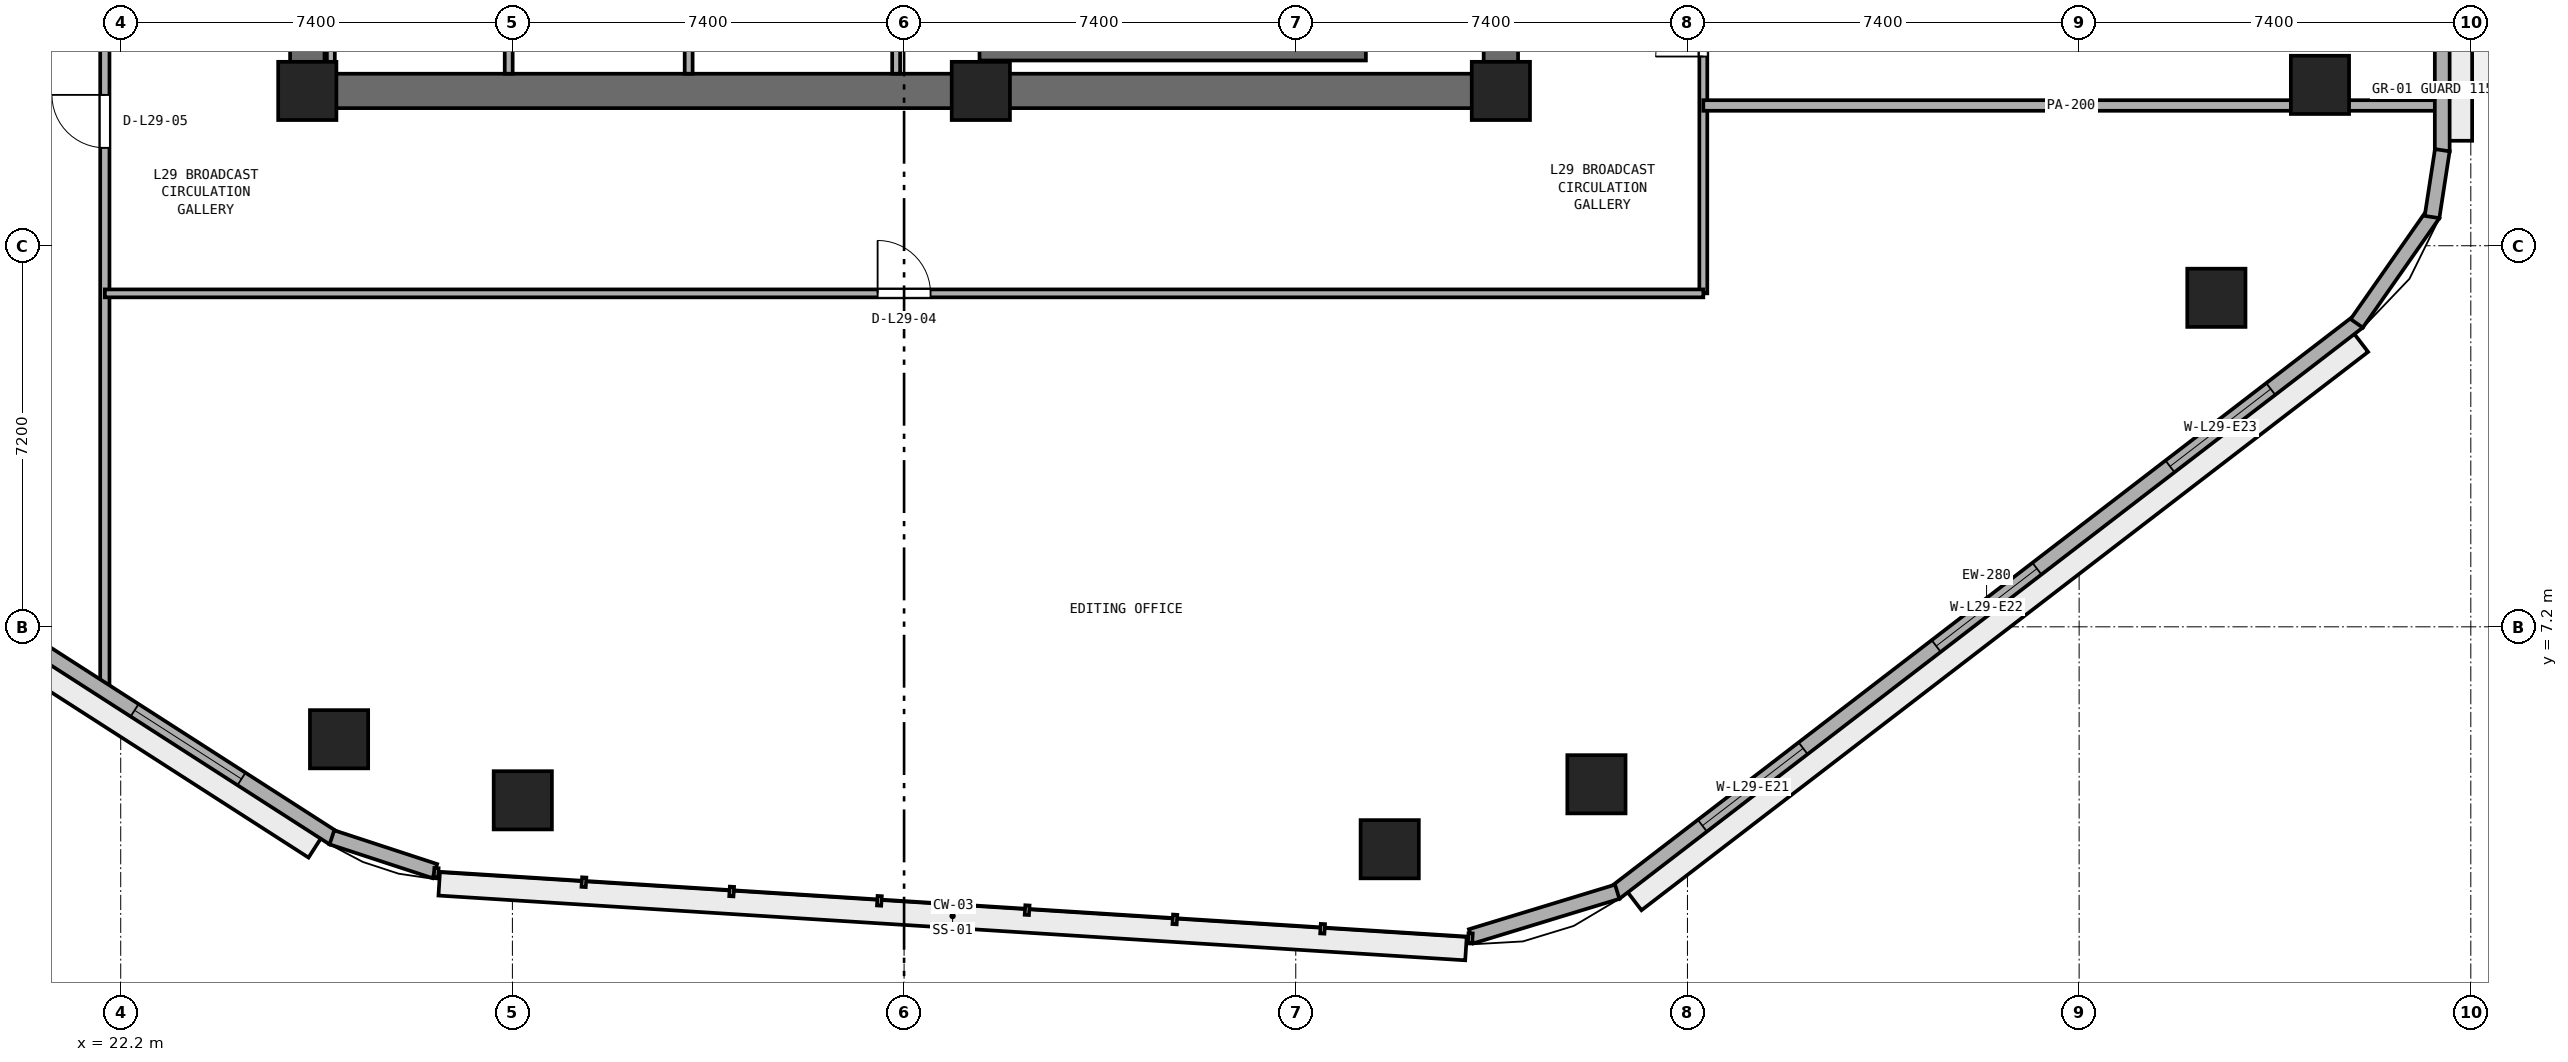
"""IFC4 building model, lengths in metres.
Left out: names, types, materials, properties, quantities, classifications, styles, units other than length and angle.
Written with IfcOpenShell. Run it as: python <this file> out.ifc"""

import sys

from ifc_helpers import new_model, si_unit, direction, frame, frame_2d, origin, origin_2d, place, context, subcontext, project, spatial, rectangle, extrude, element, fill, save


model = new_model("IFC4")
c1 = context("Model", 3, precision=1e-05, world=origin(), true_north=direction((0.0, 1.0)))
c2 = subcontext(c1, "Body", "Model", "MODEL_VIEW")
j1 = project(units=[si_unit("LENGTHUNIT", "METRE"), si_unit("PLANEANGLEUNIT", "RADIAN")], contexts=[c1])
p1 = place(None, origin())
s1 = spatial("IfcSite", under=j1, at=p1, CompositionType="ELEMENT")
p2 = place(p1, origin())
s2 = spatial("IfcBuilding", under=s1, at=p2, CompositionType="ELEMENT")
p3 = place(p2, frame((0.0, 0.0, 116.2)))
s3 = spatial("IfcBuildingStorey", under=s2, at=p3, CompositionType="ELEMENT", Elevation=116.2)
p4 = place(p3, frame((25.4, 17.325, 0.0), z_axis=(0.0, 0.0, 1.0), x_axis=(1.0, 0.0, 0.0)))
e1 = element("IfcWall", 1, at=p4, inside=s3, PredefinedType="SHEAR", context=c2, shape_type="SweptSolid", body=[
    extrude(rectangle(XDim=23.2, YDim=0.65, at=frame_2d((11.6, 0.0))), origin(), (0.0, 0.0, 1.0), 3.4),
])
p5 = place(p3, frame((25.725, 17.65, 0.0), z_axis=(0.0, 0.0, 1.0), x_axis=(0.0, 1.0, 0.0)))
e2 = element("IfcWall", 2, at=p5, inside=s3, PredefinedType="SHEAR", context=c2, shape_type="SweptSolid", body=[
    extrude(rectangle(XDim=15.1, YDim=0.65, at=frame_2d((7.55, 0.0))), origin(), (0.0, 0.0, 1.0), 3.4),
])
p6 = place(p5, frame((6.8, 0.0, 0.0)))
e3 = element("IfcOpeningElement", 3, at=p6, cuts=e2, PredefinedType="OPENING", context=c2, shape_type="SweptSolid", body=[
    extrude(rectangle(XDim=1.5, YDim=2.15, at=frame_2d((0.75, 1.075))), frame((0.0, 0.335, 0.0), z_axis=(0.0, -1.0, 0.0), x_axis=(1.0, 0.0, 0.0)), (0.0, 0.0, 1.0), 0.67),
])
p7 = place(p3, frame((48.275, 17.65, 0.0), z_axis=(0.0, 0.0, 1.0), x_axis=(0.0, 1.0, 0.0)))
e4 = element("IfcWall", 4, at=p7, inside=s3, PredefinedType="SHEAR", context=c2, shape_type="SweptSolid", body=[
    extrude(rectangle(XDim=15.1, YDim=0.65, at=frame_2d((7.55, 0.0))), origin(), (0.0, 0.0, 1.0), 3.4),
])
p8 = place(p7, frame((5.65, 0.0, 0.0)))
e5 = element("IfcOpeningElement", 5, at=p8, cuts=e4, PredefinedType="OPENING", context=c2, shape_type="SweptSolid", body=[
    extrude(rectangle(XDim=1.5, YDim=2.15, at=frame_2d((0.75, 1.075))), frame((0.0, 0.335, 0.0), z_axis=(0.0, -1.0, 0.0), x_axis=(1.0, 0.0, 0.0)), (0.0, 0.0, 1.0), 0.67),
])
for number, where, z_axis, x_axis in (
    (6, (25.725, 17.325, 0.0), (0.0, 0.0, 1.0), (1.0, 0.0, 0.0)),
    (7, (38.45, 17.325, 0.0), (0.0, 0.0, 1.0), (1.0, 0.0, 0.0)),
    (8, (48.275, 17.325, 0.0), (0.0, 0.0, 1.0), (1.0, 0.0, 0.0)),
):
    element("IfcColumn", number, at=place(p3, frame(where, z_axis=z_axis, x_axis=x_axis)), inside=s3, PredefinedType="PILASTER", context=c2, shape_type="SweptSolid", body=[
        extrude(rectangle(XDim=1.1, YDim=1.1, at=origin_2d()), origin(), (0.0, 0.0, 1.0), 3.8),
    ])
for number, where, z_axis, x_axis in (
    (9, (29.796, 3.922, 0.0), (0.0, 0.0, 1.0), (1.0, 0.0, 0.0)),
    (10, (46.175, 2.998, 0.0), (0.0, 0.0, 1.0), (1.0, 0.0, 0.0)),
    (11, (50.081, 4.225, 0.0), (0.0, 0.0, 1.0), (1.0, 0.0, 0.0)),
    (12, (61.793, 13.416, 0.0), (0.0, 0.0, 1.0), (1.0, 0.0, 0.0)),
    (13, (63.75, 17.44, 0.0), (0.0, 0.0, 1.0), (1.0, 0.0, 0.0)),
    (14, (26.325, 5.076, 0.0), (0.0, 0.0, 1.0), (1.0, 0.0, 0.0)),
):
    element("IfcColumn", number, at=place(p3, frame(where, z_axis=z_axis, x_axis=x_axis)), inside=s3, PredefinedType="COLUMN", context=c2, shape_type="SweptSolid", body=[
        extrude(rectangle(XDim=1.1, YDim=1.1, at=origin_2d()), origin(), (0.0, 0.0, 1.0), 3.8),
    ])
p9 = place(p3, frame((38.425, 18.025, 0.0), z_axis=(0.0, 0.0, 1.0), x_axis=(1.0, 0.0, 0.0)))
e15 = element("IfcWall", 15, at=p9, inside=s3, PredefinedType="SHEAR", context=c2, shape_type="SweptSolid", body=[
    extrude(rectangle(XDim=7.3, YDim=0.25, at=frame_2d((3.65, 0.0))), origin(), (0.0, 0.0, 1.0), 3.4),
])
for number, where, z_axis, x_axis in (
    (16, (26.17, 17.65, 0.0), (0.0, 0.0, 1.0), (0.0, 1.0, 0.0)),
    (17, (29.53, 17.65, 0.0), (0.0, 0.0, 1.0), (0.0, 1.0, 0.0)),
    (18, (32.93, 17.65, 0.0), (0.0, 0.0, 1.0), (0.0, 1.0, 0.0)),
    (19, (36.85, 17.65, 0.0), (0.0, 0.0, 1.0), (0.0, 1.0, 0.0)),
):
    element("IfcWall", number, at=place(p3, frame(where, z_axis=z_axis, x_axis=x_axis)), inside=s3, PredefinedType="PARTITIONING", context=c2, shape_type="SweptSolid", body=[
        extrude(rectangle(XDim=2.1, YDim=0.15, at=frame_2d((1.05, 0.0))), origin(), (0.0, 0.0, 1.0), 3.4),
    ])
p10 = place(p3, frame((52.1, 13.5, 0.0), z_axis=(0.0, 0.0, 1.0), x_axis=(0.0, 1.0, 0.0)))
e20 = element("IfcWall", 20, at=p10, inside=s3, PredefinedType="PARTITIONING", context=c2, shape_type="SweptSolid", body=[
    extrude(rectangle(XDim=33.723, YDim=0.15, at=frame_2d((16.861, 0.0))), origin(), (0.0, 0.0, 1.0), 3.4),
])
p11 = place(p10, frame((4.475, 0.0, 0.0)))
e21 = element("IfcOpeningElement", 21, at=p11, cuts=e20, PredefinedType="OPENING", context=c2, shape_type="SweptSolid", body=[
    extrude(rectangle(XDim=0.9, YDim=2.1, at=frame_2d((0.45, 1.05))), frame((0.0, 0.085, 0.0), z_axis=(0.0, -1.0, 0.0), x_axis=(1.0, 0.0, 0.0)), (0.0, 0.0, 1.0), 0.17),
])
p12 = place(p10, frame((9.85, 0.0, 0.0)))
e22 = element("IfcOpeningElement", 22, at=p12, cuts=e20, PredefinedType="OPENING", context=c2, shape_type="SweptSolid", body=[
    extrude(rectangle(XDim=0.9, YDim=2.1, at=frame_2d((0.45, 1.05))), frame((0.0, 0.085, 0.0), z_axis=(0.0, -1.0, 0.0), x_axis=(1.0, 0.0, 0.0)), (0.0, 0.0, 1.0), 0.17),
])
p13 = place(p10, frame((18.4, 0.0, 0.0)))
e23 = element("IfcOpeningElement", 23, at=p13, cuts=e20, PredefinedType="OPENING", context=c2, shape_type="SweptSolid", body=[
    extrude(rectangle(XDim=0.9, YDim=2.1, at=frame_2d((0.45, 1.05))), frame((0.0, 0.085, 0.0), z_axis=(0.0, -1.0, 0.0), x_axis=(1.0, 0.0, 0.0)), (0.0, 0.0, 1.0), 0.17),
])
p14 = place(p3, frame((21.9, 5.958, 0.0), z_axis=(0.0, 0.0, 1.0), x_axis=(0.0, 1.0, 0.0)))
e24 = element("IfcWall", 24, at=p14, inside=s3, PredefinedType="PARTITIONING", context=c2, shape_type="SweptSolid", body=[
    extrude(rectangle(XDim=30.942, YDim=0.175, at=frame_2d((15.471, 0.0))), origin(), (0.0, 0.0, 1.0), 3.4),
])
p15 = place(p14, frame((10.292, 0.0, 0.0)))
e25 = element("IfcOpeningElement", 25, at=p15, cuts=e24, PredefinedType="OPENING", context=c2, shape_type="SweptSolid", body=[
    extrude(rectangle(XDim=1.0, YDim=2.12, at=frame_2d((0.5, 1.06))), frame((0.0, 0.097, 0.0), z_axis=(0.0, -1.0, 0.0), x_axis=(1.0, 0.0, 0.0)), (0.0, 0.0, 1.0), 0.195),
])
p16 = place(p14, frame((16.842, 0.0, 0.0)))
e26 = element("IfcOpeningElement", 26, at=p16, cuts=e24, PredefinedType="OPENING", context=c2, shape_type="SweptSolid", body=[
    extrude(rectangle(XDim=1.0, YDim=2.12, at=frame_2d((0.5, 1.06))), frame((0.0, 0.097, 0.0), z_axis=(0.0, -1.0, 0.0), x_axis=(1.0, 0.0, 0.0)), (0.0, 0.0, 1.0), 0.195),
])
p17 = place(p14, frame((23.492, 0.0, 0.0)))
e27 = element("IfcOpeningElement", 27, at=p17, cuts=e24, PredefinedType="OPENING", context=c2, shape_type="SweptSolid", body=[
    extrude(rectangle(XDim=0.9, YDim=2.1, at=frame_2d((0.45, 1.05))), frame((0.0, 0.097, 0.0), z_axis=(0.0, -1.0, 0.0), x_axis=(1.0, 0.0, 0.0)), (0.0, 0.0, 1.0), 0.195),
])
p18 = place(p3, frame((21.9, 13.5, 0.0), z_axis=(0.0, 0.0, 1.0), x_axis=(1.0, 0.0, 0.0)))
e28 = element("IfcWall", 28, at=p18, inside=s3, PredefinedType="PARTITIONING", context=c2, shape_type="SweptSolid", body=[
    extrude(rectangle(XDim=30.2, YDim=0.15, at=frame_2d((15.1, 0.0))), origin(), (0.0, 0.0, 1.0), 3.4),
])
p19 = place(p18, frame((14.6, 0.0, 0.0)))
e29 = element("IfcOpeningElement", 29, at=p19, cuts=e28, PredefinedType="OPENING", context=c2, shape_type="SweptSolid", body=[
    extrude(rectangle(XDim=1.0, YDim=2.12, at=frame_2d((0.5, 1.06))), frame((0.0, 0.085, 0.0), z_axis=(0.0, -1.0, 0.0), x_axis=(1.0, 0.0, 0.0)), (0.0, 0.0, 1.0), 0.17),
])
p20 = place(p3, frame((52.1, 17.05, 0.0), z_axis=(0.0, 0.0, 1.0), x_axis=(1.0, 0.0, 0.0)))
e30 = element("IfcWall", 30, at=p20, inside=s3, PredefinedType="PARTITIONING", context=c2, shape_type="SweptSolid", body=[
    extrude(rectangle(XDim=13.895, YDim=0.2, at=frame_2d((6.948, 0.0))), origin(), (0.0, 0.0, 1.0), 3.4),
])
p21 = place(p3, frame((50.429, 2.172, 0.0), z_axis=(0.0, 0.0, 1.0), x_axis=(0.792937466367, 0.609303023488, 0.0)))
e31 = element("IfcWall", 31, at=p21, inside=s3, PredefinedType="STANDARD", context=c2, shape_type="SweptSolid", body=[
    extrude(rectangle(XDim=17.713, YDim=0.28, at=frame_2d((8.856, 0.0))), origin(), (0.0, 0.0, 1.0), 3.4),
])
p22 = place(p21, frame((2.085, 0.0, 0.9)))
e32 = element("IfcOpeningElement", 32, at=p22, cuts=e31, PredefinedType="OPENING", context=c2, shape_type="SweptSolid", body=[
    extrude(rectangle(XDim=2.4, YDim=1.75, at=frame_2d((1.2, 0.875))), frame((0.0, 0.15, 0.0), z_axis=(0.0, -1.0, 0.0), x_axis=(1.0, 0.0, 0.0)), (0.0, 0.0, 1.0), 0.3),
])
p23 = place(p21, frame((7.656, 0.0, 0.9)))
e33 = element("IfcOpeningElement", 33, at=p23, cuts=e31, PredefinedType="OPENING", context=c2, shape_type="SweptSolid", body=[
    extrude(rectangle(XDim=2.4, YDim=1.75, at=frame_2d((1.2, 0.875))), frame((0.0, 0.15, 0.0), z_axis=(0.0, -1.0, 0.0), x_axis=(1.0, 0.0, 0.0)), (0.0, 0.0, 1.0), 0.3),
])
p24 = place(p21, frame((13.227, 0.0, 0.9)))
e34 = element("IfcOpeningElement", 34, at=p24, cuts=e31, PredefinedType="OPENING", context=c2, shape_type="SweptSolid", body=[
    extrude(rectangle(XDim=2.4, YDim=1.75, at=frame_2d((1.2, 0.875))), frame((0.0, 0.15, 0.0), z_axis=(0.0, -1.0, 0.0), x_axis=(1.0, 0.0, 0.0)), (0.0, 0.0, 1.0), 0.3),
])
p25 = place(p3, frame((66.06, 16.183, 0.0), z_axis=(0.0, 0.0, 1.0), x_axis=(0.0, 1.0, 0.0)))
e35 = element("IfcWall", 35, at=p25, inside=s3, PredefinedType="STANDARD", context=c2, shape_type="SweptSolid", body=[
    extrude(rectangle(XDim=19.331, YDim=0.28, at=frame_2d((9.666, 0.0))), origin(), (0.0, 0.0, 1.0), 3.4),
])
p26 = place(p25, frame((9.115, 0.0, 0.0)))
e36 = element("IfcOpeningElement", 36, at=p26, cuts=e35, PredefinedType="OPENING", context=c2, shape_type="SweptSolid", body=[
    extrude(rectangle(XDim=1.1, YDim=2.2, at=frame_2d((0.55, 1.1))), frame((0.0, 0.15, 0.0), z_axis=(0.0, -1.0, 0.0), x_axis=(1.0, 0.0, 0.0)), (0.0, 0.0, 1.0), 0.3),
])
p27 = place(p25, frame((14.576, 0.0, 0.9)))
e37 = element("IfcOpeningElement", 37, at=p27, cuts=e35, PredefinedType="OPENING", context=c2, shape_type="SweptSolid", body=[
    extrude(rectangle(XDim=2.4, YDim=1.75, at=frame_2d((1.2, 0.875))), frame((0.0, 0.15, 0.0), z_axis=(0.0, -1.0, 0.0), x_axis=(1.0, 0.0, 0.0)), (0.0, 0.0, 1.0), 0.3),
])
p28 = place(p3, frame((11.405, 12.728, 0.0), z_axis=(0.0, 0.0, 1.0), x_axis=(0.841304564637, -0.540561402175, 0.0)))
e38 = element("IfcWall", 38, at=p28, inside=s3, PredefinedType="STANDARD", context=c2, shape_type="SweptSolid", body=[
    extrude(rectangle(XDim=17.612, YDim=0.28, at=frame_2d((8.806, 0.0))), origin(), (0.0, 0.0, 1.0), 3.4),
])
p29 = place(p28, frame((2.069, 0.0, 0.9)))
e39 = element("IfcOpeningElement", 39, at=p29, cuts=e38, PredefinedType="OPENING", context=c2, shape_type="SweptSolid", body=[
    extrude(rectangle(XDim=2.4, YDim=1.75, at=frame_2d((1.2, 0.875))), frame((0.0, 0.15, 0.0), z_axis=(0.0, -1.0, 0.0), x_axis=(1.0, 0.0, 0.0)), (0.0, 0.0, 1.0), 0.3),
])
p30 = place(p28, frame((7.606, 0.0, 0.9)))
e40 = element("IfcOpeningElement", 40, at=p30, cuts=e38, PredefinedType="OPENING", context=c2, shape_type="SweptSolid", body=[
    extrude(rectangle(XDim=2.4, YDim=1.75, at=frame_2d((1.2, 0.875))), frame((0.0, 0.15, 0.0), z_axis=(0.0, -1.0, 0.0), x_axis=(1.0, 0.0, 0.0)), (0.0, 0.0, 1.0), 0.3),
])
p31 = place(p28, frame((13.143, 0.0, 0.9)))
e41 = element("IfcOpeningElement", 41, at=p31, cuts=e38, PredefinedType="OPENING", context=c2, shape_type="SweptSolid", body=[
    extrude(rectangle(XDim=2.4, YDim=1.75, at=frame_2d((1.2, 0.875))), frame((0.0, 0.15, 0.0), z_axis=(0.0, -1.0, 0.0), x_axis=(1.0, 0.0, 0.0)), (0.0, 0.0, 1.0), 0.3),
])
p32 = place(p3, frame((47.712, 1.352, 0.0), z_axis=(0.0, 0.0, 1.0), x_axis=(0.956465727645, 0.291844670743, 0.0)))
e42 = element("IfcWall", 42, at=p32, inside=s3, PredefinedType="STANDARD", context=c2, shape_type="SweptSolid", body=[
    extrude(rectangle(XDim=2.887, YDim=0.28, at=frame_2d((1.443, 0.0))), origin(), (0.0, 0.0, 1.0), 3.4),
])
p33 = place(p3, frame((64.444, 12.933, 0.0), z_axis=(0.0, 0.0, 1.0), x_axis=(0.573176686443, 0.819431806875, 0.0)))
e43 = element("IfcWall", 43, at=p33, inside=s3, PredefinedType="STANDARD", context=c2, shape_type="SweptSolid", body=[
    extrude(rectangle(XDim=2.524, YDim=0.28, at=frame_2d((1.262, 0.0))), origin(), (0.0, 0.0, 1.0), 3.4),
])
p34 = place(p3, frame((65.867, 14.943, 0.0), z_axis=(0.0, 0.0, 1.0), x_axis=(0.152014078361, 0.988378328364, 0.0)))
e44 = element("IfcWall", 44, at=p34, inside=s3, PredefinedType="STANDARD", context=c2, shape_type="SweptSolid", body=[
    extrude(rectangle(XDim=1.277, YDim=0.28, at=frame_2d((0.638, 0.0))), origin(), (0.0, 0.0, 1.0), 3.4),
])
p35 = place(p3, frame((26.19, 3.223, 0.0), z_axis=(0.0, 0.0, 1.0), x_axis=(0.950175683881, -0.311714885371, 0.0)))
e45 = element("IfcWall", 45, at=p35, inside=s3, PredefinedType="STANDARD", context=c2, shape_type="SweptSolid", body=[
    extrude(rectangle(XDim=2.047, YDim=0.28, at=frame_2d((1.023, 0.0))), origin(), (0.0, 0.0, 1.0), 3.4),
])
p36 = place(p19, origin())
e46 = element("IfcDoor", 46, at=p36, inside=s3, OperationType="SINGLE_SWING_LEFT", PredefinedType="DOOR", context=c2, shape_type="SweptSolid", body=[
    extrude(rectangle(XDim=1.0, YDim=2.12, at=frame_2d((0.5, 1.06))), frame((0.0, 0.025, 0.0), z_axis=(0.0, -1.0, 0.0), x_axis=(1.0, 0.0, 0.0)), (0.0, 0.0, 1.0), 0.05),
])
fill(e29, e46)
p37 = place(p15, origin())
e47 = element("IfcDoor", 47, at=p37, inside=s3, OperationType="SINGLE_SWING_RIGHT", PredefinedType="DOOR", context=c2, shape_type="SweptSolid", body=[
    extrude(rectangle(XDim=1.0, YDim=2.12, at=frame_2d((0.5, 1.06))), frame((0.0, 0.025, 0.0), z_axis=(0.0, -1.0, 0.0), x_axis=(1.0, 0.0, 0.0)), (0.0, 0.0, 1.0), 0.05),
])
fill(e25, e47)
p38 = place(p11, origin())
e48 = element("IfcDoor", 48, at=p38, inside=s3, OperationType="SINGLE_SWING_LEFT", PredefinedType="DOOR", context=c2, shape_type="SweptSolid", body=[
    extrude(rectangle(XDim=0.9, YDim=2.1, at=frame_2d((0.45, 1.05))), frame((0.0, 0.025, 0.0), z_axis=(0.0, -1.0, 0.0), x_axis=(1.0, 0.0, 0.0)), (0.0, 0.0, 1.0), 0.05),
])
fill(e21, e48)
p39 = place(p22, origin())
e49 = element("IfcWindow", 49, at=p39, inside=s3, PartitioningType="SINGLE_PANEL", PredefinedType="WINDOW", context=c2, shape_type="SweptSolid", body=[
    extrude(rectangle(XDim=2.4, YDim=1.75, at=frame_2d((1.2, 0.875))), frame((0.0, 0.03, 0.0), z_axis=(0.0, -1.0, 0.0), x_axis=(1.0, 0.0, 0.0)), (0.0, 0.0, 1.0), 0.06),
])
fill(e32, e49)
p40 = place(p23, origin())
e50 = element("IfcWindow", 50, at=p40, inside=s3, PartitioningType="SINGLE_PANEL", PredefinedType="WINDOW", context=c2, shape_type="SweptSolid", body=[
    extrude(rectangle(XDim=2.4, YDim=1.75, at=frame_2d((1.2, 0.875))), frame((0.0, 0.03, 0.0), z_axis=(0.0, -1.0, 0.0), x_axis=(1.0, 0.0, 0.0)), (0.0, 0.0, 1.0), 0.06),
])
fill(e33, e50)
p41 = place(p24, origin())
e51 = element("IfcWindow", 51, at=p41, inside=s3, PartitioningType="SINGLE_PANEL", PredefinedType="WINDOW", context=c2, shape_type="SweptSolid", body=[
    extrude(rectangle(XDim=2.4, YDim=1.75, at=frame_2d((1.2, 0.875))), frame((0.0, 0.03, 0.0), z_axis=(0.0, -1.0, 0.0), x_axis=(1.0, 0.0, 0.0)), (0.0, 0.0, 1.0), 0.06),
])
fill(e34, e51)
p42 = place(p31, origin())
e52 = element("IfcWindow", 52, at=p42, inside=s3, PartitioningType="SINGLE_PANEL", PredefinedType="WINDOW", context=c2, shape_type="SweptSolid", body=[
    extrude(rectangle(XDim=2.4, YDim=1.75, at=frame_2d((1.2, 0.875))), frame((0.0, 0.03, 0.0), z_axis=(0.0, -1.0, 0.0), x_axis=(1.0, 0.0, 0.0)), (0.0, 0.0, 1.0), 0.06),
])
fill(e41, e52)
save(model, sys.argv[1])
